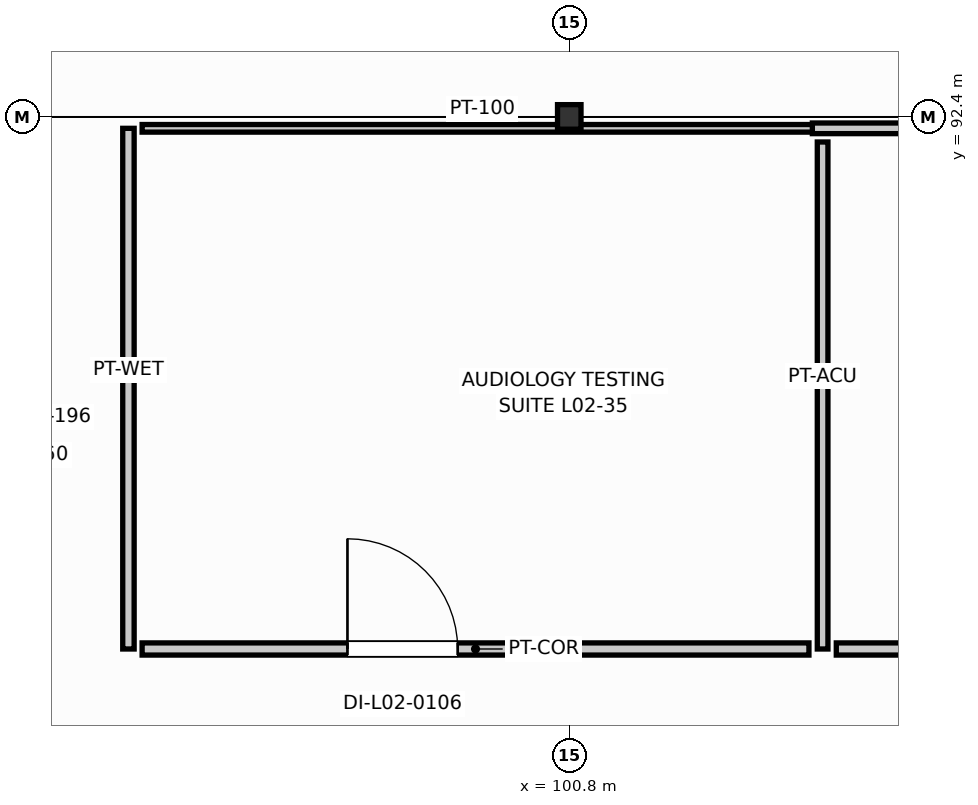
"""IFC4 building model, lengths in metres.
Left out: names, types, materials, properties, quantities, classifications, styles, units other than length and angle.
Written with IfcOpenShell. Run it as: python <this file> out.ifc"""

import sys

from ifc_helpers import new_model, si_unit, direction, frame, frame_2d, origin, origin_2d, place, context, subcontext, project, spatial, rectangle, i_section, extrude, element, fill, save


model = new_model("IFC4")
c1 = context("Model", 3, precision=1e-05, world=origin(), true_north=direction((0.0, 1.0)))
c2 = subcontext(c1, "Body", "Model", "MODEL_VIEW")
j1 = project(units=[si_unit("LENGTHUNIT", "METRE"), si_unit("PLANEANGLEUNIT", "RADIAN")], contexts=[c1])
p1 = place(None, origin())
s1 = spatial("IfcSite", under=j1, at=p1, CompositionType="ELEMENT")
p2 = place(p1, origin())
s2 = spatial("IfcBuilding", under=s1, at=p2, CompositionType="ELEMENT")
p3 = place(p2, frame((0.0, 0.0, 9.0)))
s3 = spatial("IfcBuildingStorey", under=s2, at=p3, CompositionType="ELEMENT", Elevation=9.0)
p4 = place(p3, frame((100.8, 92.4, 0.0), z_axis=(0.0, 0.0, 1.0), x_axis=(1.0, 0.0, 0.0)))
e1 = element("IfcColumn", 1, at=p4, inside=s3, PredefinedType="COLUMN", context=c2, shape_type="SweptSolid", body=[
    extrude(i_section(OverallWidth=0.309, OverallDepth=0.323, WebThickness=0.014, FlangeThickness=0.023, FilletRadius=0.016, at=origin_2d()), origin(), (0.0, 0.0, 1.0), 4.2),
])
p5 = place(p3, frame((95.0, 85.4, 0.0), z_axis=(0.0, 0.0, 1.0), x_axis=(0.0, 1.0, 0.0)))
e2 = element("IfcWall", 2, at=p5, inside=s3, PredefinedType="PLUMBINGWALL", context=c2, shape_type="SweptSolid", body=[
    extrude(rectangle(XDim=6.85, YDim=0.15, at=frame_2d((3.425, 0.0))), origin(), (0.0, 0.0, 1.0), 3.535),
])
p6 = place(p3, frame((95.18, 92.25, 0.0), z_axis=(0.0, 0.0, 1.0), x_axis=(1.0, 0.0, 0.0)))
e3 = element("IfcWall", 3, at=p6, inside=s3, PredefinedType="PARTITIONING", context=c2, shape_type="SweptSolid", body=[
    extrude(rectangle(XDim=8.953, YDim=0.1, at=frame_2d((4.477, 0.0))), origin(), (0.0, 0.0, 1.0), 3.252),
])
p7 = place(p3, frame((104.133, 92.07, 0.0), z_axis=(0.0, 0.0, 1.0), x_axis=(0.0, -1.0, 0.0)))
e4 = element("IfcWall", 4, at=p7, inside=s3, PredefinedType="PARTITIONING", context=c2, shape_type="SweptSolid", body=[
    extrude(rectangle(XDim=6.67, YDim=0.14, at=frame_2d((3.335, 0.0))), origin(), (0.0, 0.0, 1.0), 3.945),
])
p8 = place(p3, frame((103.953, 85.4, 0.0), z_axis=(0.0, 0.0, 1.0), x_axis=(-1.0, 0.0, 0.0)))
e5 = element("IfcWall", 5, at=p8, inside=s3, PredefinedType="PARTITIONING", context=c2, shape_type="SweptSolid", body=[
    extrude(rectangle(XDim=8.773, YDim=0.16, at=frame_2d((4.387, 0.0))), origin(), (0.0, 0.0, 1.0), 3.252),
])
p9 = place(p8, frame((4.622, 0.0, 0.0)))
e6 = element("IfcOpeningElement", 6, at=p9, cuts=e5, PredefinedType="OPENING", context=c2, shape_type="SweptSolid", body=[
    extrude(rectangle(XDim=1.45, YDim=2.2, at=frame_2d((0.725, 1.1))), frame((0.0, 0.09, 0.0), z_axis=(0.0, -1.0, 0.0), x_axis=(1.0, 0.0, 0.0)), (0.0, 0.0, 1.0), 0.18),
])
p10 = place(p3, frame((103.998, 92.25, 0.0), z_axis=(0.0, 0.0, 1.0), x_axis=(1.0, 0.0, 0.0)))
e7 = element("IfcWall", 7, at=p10, inside=s3, PredefinedType="PARTITIONING", context=c2, shape_type="SweptSolid", body=[
    extrude(rectangle(XDim=9.268, YDim=0.14, at=frame_2d((4.634, 0.0))), origin(), (0.0, 0.0, 1.0), 3.175),
])
p11 = place(p3, frame((113.087, 85.4, 0.0), z_axis=(0.0, 0.0, 1.0), x_axis=(-1.0, 0.0, 0.0)))
e8 = element("IfcWall", 8, at=p11, inside=s3, PredefinedType="PARTITIONING", context=c2, shape_type="SweptSolid", body=[
    extrude(rectangle(XDim=8.773, YDim=0.16, at=frame_2d((4.387, 0.0))), origin(), (0.0, 0.0, 1.0), 3.175),
])
p12 = place(p11, frame((3.012, 0.0, 0.0)))
e9 = element("IfcOpeningElement", 9, at=p12, cuts=e8, PredefinedType="OPENING", context=c2, shape_type="SweptSolid", body=[
    extrude(rectangle(XDim=1.15, YDim=2.15, at=frame_2d((0.575, 1.075))), frame((0.0, 0.09, 0.0), z_axis=(0.0, -1.0, 0.0), x_axis=(1.0, 0.0, 0.0)), (0.0, 0.0, 1.0), 0.18),
])
p13 = place(p9, frame((1.45, 0.0, 0.0), z_axis=(0.0, 0.0, 1.0), x_axis=(-1.0, 0.0, 0.0)))
e10 = element("IfcDoor", 10, at=p13, inside=s3, OperationType="SINGLE_SWING_LEFT", PredefinedType="DOOR", context=c2, shape_type="SweptSolid", body=[
    extrude(rectangle(XDim=1.45, YDim=2.2, at=frame_2d((0.725, 1.1))), frame((0.0, 0.025, 0.0), z_axis=(0.0, -1.0, 0.0), x_axis=(1.0, 0.0, 0.0)), (0.0, 0.0, 1.0), 0.05),
])
fill(e6, e10)
save(model, sys.argv[1])
